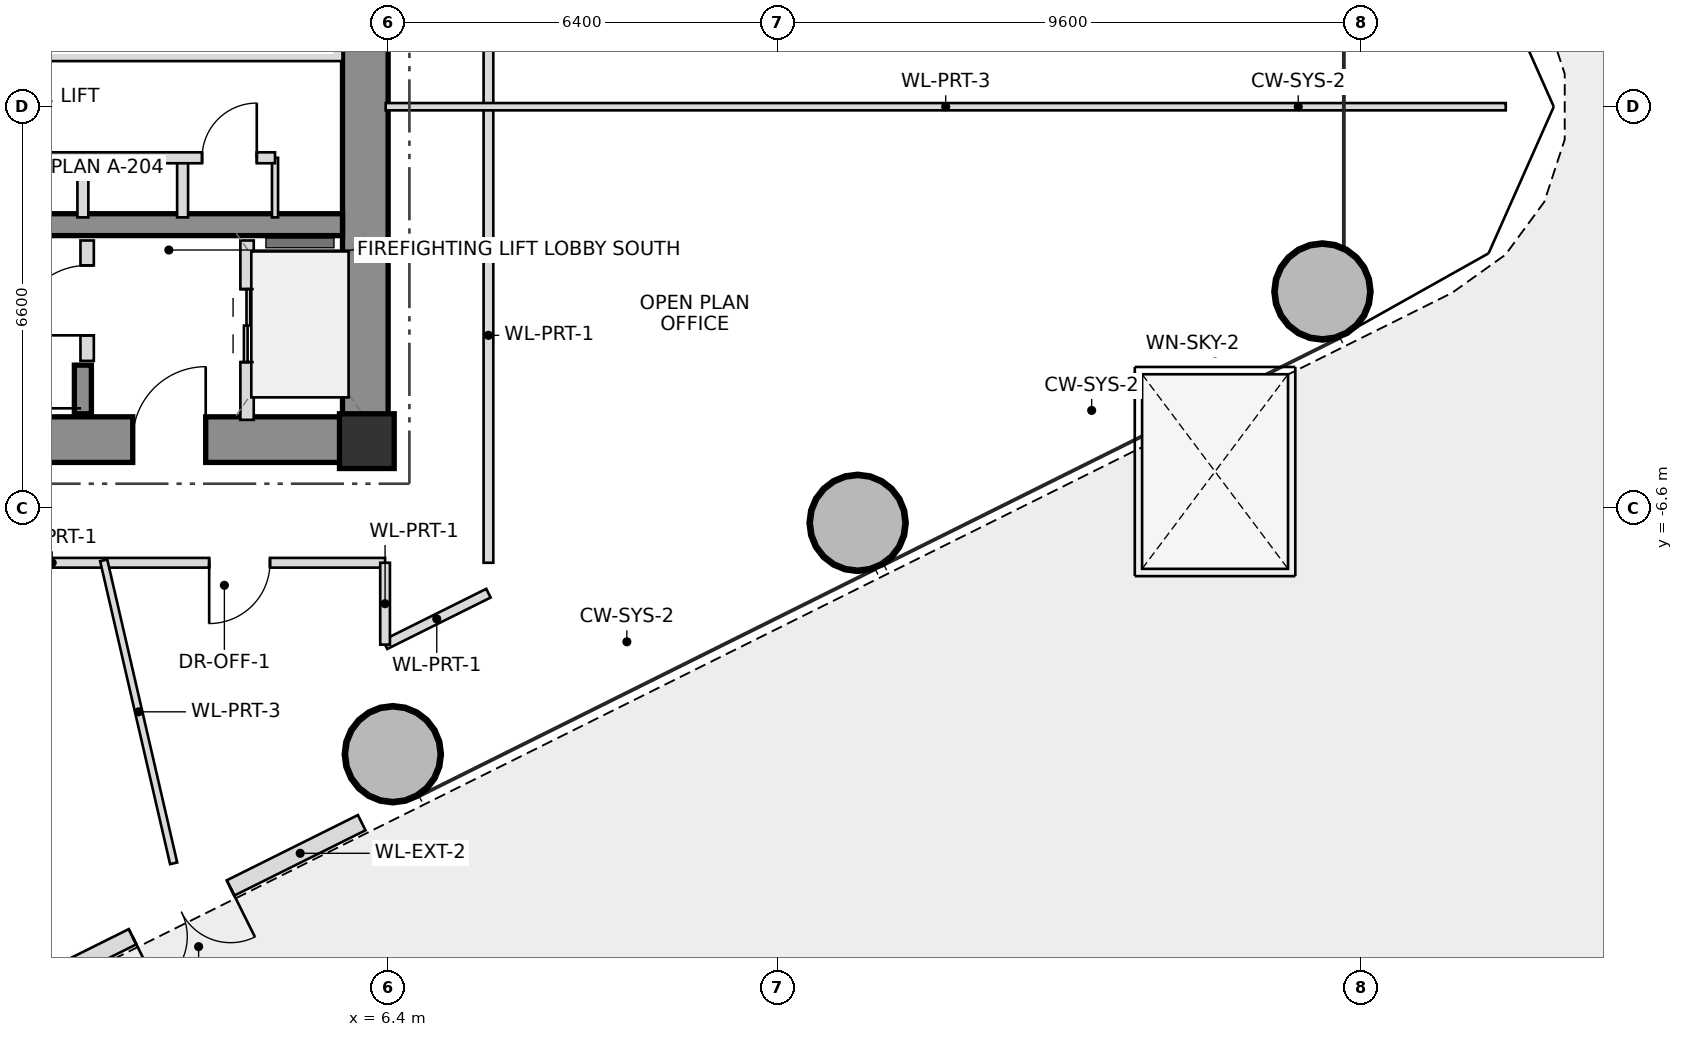
"""IFC4 building model, lengths in metres.
Left out: names, types, materials, properties, quantities, classifications, styles, units other than length and angle.
Written with IfcOpenShell. Run it as: python <this file> out.ifc"""

import sys

from ifc_helpers import new_model, si_unit, direction, frame, frame_2d, origin, origin_2d, place, context, subcontext, project, spatial, rectangle, hollow_circle, extrude, source, transform, mapped, element, fill, save


model = new_model("IFC4")
c1 = context("Model", 3, precision=1e-05, world=origin(), true_north=direction((0.0, 1.0)))
c2 = subcontext(c1, "Body", "Model", "MODEL_VIEW")
j1 = project(units=[si_unit("LENGTHUNIT", "METRE"), si_unit("PLANEANGLEUNIT", "RADIAN")], contexts=[c1])
p1 = place(None, origin())
s1 = spatial("IfcSite", under=j1, at=p1, CompositionType="ELEMENT")
p2 = place(p1, origin())
s2 = spatial("IfcBuilding", under=s1, at=p2, CompositionType="ELEMENT")
p3 = place(p2, frame((0.0, 0.0, 20.1)))
s3 = spatial("IfcBuildingStorey", under=s2, at=p3, CompositionType="ELEMENT", Elevation=20.1)
m1 = source(origin(), c2, "Body", "SweptSolid", [
    extrude(rectangle(XDim=0.9, YDim=0.9, at=origin_2d()), origin(), (0.0, 0.0, 1.0), 3.7),
])
p4 = place(p3, frame((6.05, -5.5, 0.0), z_axis=(0.0, 0.0, 1.0), x_axis=(1.0, 0.0, 0.0)))
e1 = element("IfcColumn", 1, at=p4, inside=s3, PredefinedType="COLUMN", context=c2, shape_type="MappedRepresentation", body=[
    mapped(m1, transform((0.0, 0.0, 0.0), scale=1.0)),
])
p5 = place(p3, frame((-6.4, -5.475, 0.0), z_axis=(0.0, 0.0, 1.0), x_axis=(1.0, 0.0, 0.0)))
e2 = element("IfcWall", 2, at=p5, inside=s3, PredefinedType="SHEAR", context=c2, shape_type="SweptSolid", body=[
    extrude(rectangle(XDim=12.8, YDim=0.75, at=frame_2d((6.4, 0.0))), origin(), (0.0, 0.0, 1.0), 3.7),
])
p6 = place(p5, frame((8.6, 0.0, 0.0)))
e3 = element("IfcOpeningElement", 3, at=p6, cuts=e2, PredefinedType="OPENING", context=c2, shape_type="SweptSolid", body=[
    extrude(rectangle(XDim=1.2, YDim=2.2, at=frame_2d((0.6, 1.1))), frame((0.0, 0.385, 0.0), z_axis=(0.0, -1.0, 0.0), x_axis=(1.0, 0.0, 0.0)), (0.0, 0.0, 1.0), 0.77),
])
p7 = place(p3, frame((6.025, -5.1, 0.0), z_axis=(0.0, 0.0, 1.0), x_axis=(0.0, 1.0, 0.0)))
e4 = element("IfcWall", 4, at=p7, inside=s3, PredefinedType="SHEAR", context=c2, shape_type="SweptSolid", body=[
    extrude(rectangle(XDim=10.2, YDim=0.75, at=frame_2d((5.1, 0.0))), origin(), (0.0, 0.0, 1.0), 3.7),
])
p8 = place(p3, frame((-5.65, -1.94, 0.0), z_axis=(0.0, 0.0, 1.0), x_axis=(1.0, 0.0, 0.0)))
e5 = element("IfcWall", 5, at=p8, inside=s3, PredefinedType="SHEAR", context=c2, shape_type="SweptSolid", body=[
    extrude(rectangle(XDim=11.3, YDim=0.36, at=frame_2d((5.65, 0.0))), origin(), (0.0, 0.0, 1.0), 3.7),
])
p9 = place(p3, frame((1.38, -5.05, 0.0), z_axis=(0.0, 0.0, 1.0), x_axis=(0.0, 1.0, 0.0)))
e6 = element("IfcWall", 6, at=p9, inside=s3, PredefinedType="SHEAR", context=c2, shape_type="SweptSolid", body=[
    extrude(rectangle(XDim=0.8, YDim=0.28, at=frame_2d((0.4, 0.0))), origin(), (0.0, 0.0, 1.0), 3.7),
])
m2 = source(origin(), c2, "Body", "SweptSolid", [
    extrude(hollow_circle(Radius=0.8, WallThickness=0.055, at=origin_2d()), origin(), (0.0, 0.0, 1.0), 4.02),
])
for number, where, z_axis, x_axis in (
    (7, (6.477, -10.648, -0.32), (0.0, 0.0, 1.0), (1.0, 0.0, 0.0)),
    (8, (14.122, -6.844, -0.32), (0.0, 0.0, 1.0), (1.0, 0.0, 0.0)),
    (9, (21.766, -3.039, -0.32), (0.0, 0.0, 1.0), (1.0, 0.0, 0.0)),
):
    element("IfcColumn", number, at=place(p3, frame(where, z_axis=z_axis, x_axis=x_axis)), inside=s3, PredefinedType="COLUMN", context=c2, shape_type="MappedRepresentation", body=[
        mapped(m2, transform((0.0, 0.0, 0.0), scale=1.0)),
    ])
p10 = place(p3, frame((5.966, -11.774, 0.0), z_axis=(0.0, 0.0, 1.0), x_axis=(-0.895251869384, -0.445560422798, 0.0)))
e10 = element("IfcWall", 10, at=p10, inside=s3, PredefinedType="SOLIDWALL", context=c2, shape_type="SweptSolid", body=[
    extrude(rectangle(XDim=6.619, YDim=0.28, at=frame_2d((3.31, 0.0))), origin(), (0.0, 0.0, 1.0), 2.915),
])
p11 = place(p10, frame((2.409, 0.0, 0.0)))
e11 = element("IfcOpeningElement", 11, at=p11, cuts=e10, PredefinedType="OPENING", context=c2, shape_type="SweptSolid", body=[
    extrude(rectangle(XDim=1.8, YDim=2.35, at=frame_2d((0.9, 1.175))), frame((0.0, 0.15, 0.0), z_axis=(0.0, -1.0, 0.0), x_axis=(1.0, 0.0, 0.0)), (0.0, 0.0, 1.0), 0.3),
])
p12 = place(p3, frame((1.45, -4.18, 0.0), z_axis=(0.0, 0.0, 1.0), x_axis=(0.0, 1.0, 0.0)))
e12 = element("IfcWall", 12, at=p12, inside=s3, PredefinedType="PLUMBINGWALL", context=c2, shape_type="SweptSolid", body=[
    extrude(rectangle(XDim=1.98, YDim=0.22, at=frame_2d((0.99, 0.0))), origin(), (0.0, 0.0, 1.0), 3.495),
])
p13 = place(p12, frame((0.42, 0.0, 0.0)))
e13 = element("IfcOpeningElement", 13, at=p13, cuts=e12, PredefinedType="OPENING", context=c2, shape_type="SweptSolid", body=[
    extrude(rectangle(XDim=1.15, YDim=2.15, at=frame_2d((0.575, 1.075))), frame((0.0, 0.12, 0.0), z_axis=(0.0, -1.0, 0.0), x_axis=(1.0, 0.0, 0.0)), (0.0, 0.0, 1.0), 0.24),
])
p14 = place(p3, frame((4.08, -5.15, 0.0), z_axis=(0.0, 0.0, 1.0), x_axis=(0.0, 1.0, 0.0)))
e14 = element("IfcWall", 14, at=p14, inside=s3, PredefinedType="PLUMBINGWALL", context=c2, shape_type="SweptSolid", body=[
    extrude(rectangle(XDim=2.95, YDim=0.22, at=frame_2d((1.475, 0.0))), origin(), (0.0, 0.0, 1.0), 3.495),
])
p15 = place(p14, frame((0.95, 0.0, 0.0)))
e15 = element("IfcOpeningElement", 15, at=p15, cuts=e14, PredefinedType="OPENING", context=c2, shape_type="SweptSolid", body=[
    extrude(rectangle(XDim=1.2, YDim=2.25, at=frame_2d((0.6, 1.125))), frame((0.0, 0.12, 0.0), z_axis=(0.0, -1.0, 0.0), x_axis=(1.0, 0.0, 0.0)), (0.0, 0.0, 1.0), 0.24),
])
for number, where, z_axis, x_axis in (
    (16, (1.38, 0.84, 0.0), (0.0, 0.0, 1.0), (0.0, 1.0, 0.0)),
    (17, (1.38, -1.82, 0.0), (0.0, 0.0, 1.0), (0.0, 1.0, 0.0)),
    (18, (3.02, 0.84, 0.0), (0.0, 0.0, 1.0), (0.0, 1.0, 0.0)),
    (19, (4.38, 0.84, 0.0), (0.0, 0.0, 1.0), (0.0, 1.0, 0.0)),
    (20, (3.02, -1.82, 0.0), (0.0, 0.0, 1.0), (0.0, 1.0, 0.0)),
):
    element("IfcWall", number, at=place(p3, frame(where, z_axis=z_axis, x_axis=x_axis)), inside=s3, PredefinedType="PLUMBINGWALL", context=c2, shape_type="SweptSolid", body=[
        extrude(rectangle(XDim=0.98, YDim=0.18, at=frame_2d((0.49, 0.0))), origin(), (0.0, 0.0, 1.0), 3.495),
    ])
p16 = place(p3, frame((4.54, -1.82, 0.0), z_axis=(0.0, 0.0, 1.0), x_axis=(0.0, 1.0, 0.0)))
e21 = element("IfcWall", 21, at=p16, inside=s3, PredefinedType="PARTITIONING", context=c2, shape_type="SweptSolid", body=[
    extrude(rectangle(XDim=0.98, YDim=0.1, at=frame_2d((0.49, 0.0))), origin(), (0.0, 0.0, 1.0), 3.495),
])
p17 = place(p3, frame((-5.68, 0.84, 0.0), z_axis=(0.0, 0.0, 1.0), x_axis=(1.0, 0.0, 0.0)))
e22 = element("IfcWall", 22, at=p17, inside=s3, PredefinedType="PLUMBINGWALL", context=c2, shape_type="SweptSolid", body=[
    extrude(rectangle(XDim=11.33, YDim=0.18, at=frame_2d((5.665, 0.0))), origin(), (0.0, 0.0, 1.0), 3.495),
])
p18 = place(p17, frame((0.43, 0.0, 0.0)))
e23 = element("IfcOpeningElement", 23, at=p18, cuts=e22, PredefinedType="OPENING", context=c2, shape_type="SweptSolid", body=[
    extrude(rectangle(XDim=1.1, YDim=2.2, at=frame_2d((0.55, 1.1))), frame((0.0, 0.1, 0.0), z_axis=(0.0, -1.0, 0.0), x_axis=(1.0, 0.0, 0.0)), (0.0, 0.0, 1.0), 0.2),
])
p19 = place(p17, frame((2.13, 0.0, 0.0)))
e24 = element("IfcOpeningElement", 24, at=p19, cuts=e22, PredefinedType="OPENING", context=c2, shape_type="SweptSolid", body=[
    extrude(rectangle(XDim=1.1, YDim=2.2, at=frame_2d((0.55, 1.1))), frame((0.0, 0.1, 0.0), z_axis=(0.0, -1.0, 0.0), x_axis=(1.0, 0.0, 0.0)), (0.0, 0.0, 1.0), 0.2),
])
p20 = place(p3, frame((-5.68, -0.84, 0.0), z_axis=(0.0, 0.0, 1.0), x_axis=(1.0, 0.0, 0.0)))
e25 = element("IfcWall", 25, at=p20, inside=s3, PredefinedType="PLUMBINGWALL", context=c2, shape_type="SweptSolid", body=[
    extrude(rectangle(XDim=10.22, YDim=0.18, at=frame_2d((5.11, 0.0))), origin(), (0.0, 0.0, 1.0), 3.495),
])
p21 = place(p20, frame((0.43, 0.0, 0.0)))
e26 = element("IfcOpeningElement", 26, at=p21, cuts=e25, PredefinedType="OPENING", context=c2, shape_type="SweptSolid", body=[
    extrude(rectangle(XDim=1.1, YDim=2.2, at=frame_2d((0.55, 1.1))), frame((0.0, 0.1, 0.0), z_axis=(0.0, -1.0, 0.0), x_axis=(1.0, 0.0, 0.0)), (0.0, 0.0, 1.0), 0.2),
])
p22 = place(p20, frame((2.13, 0.0, 0.0)))
e27 = element("IfcOpeningElement", 27, at=p22, cuts=e25, PredefinedType="OPENING", context=c2, shape_type="SweptSolid", body=[
    extrude(rectangle(XDim=1.1, YDim=2.2, at=frame_2d((0.55, 1.1))), frame((0.0, 0.1, 0.0), z_axis=(0.0, -1.0, 0.0), x_axis=(1.0, 0.0, 0.0)), (0.0, 0.0, 1.0), 0.2),
])
p23 = place(p20, frame((9.02, 0.0, 0.0)))
e28 = element("IfcOpeningElement", 28, at=p23, cuts=e25, PredefinedType="OPENING", context=c2, shape_type="SweptSolid", body=[
    extrude(rectangle(XDim=0.9, YDim=2.05, at=frame_2d((0.45, 1.025))), frame((0.0, 0.1, 0.0), z_axis=(0.0, -1.0, 0.0), x_axis=(1.0, 0.0, 0.0)), (0.0, 0.0, 1.0), 0.2),
])
p24 = place(p3, frame((6.35, -7.5, 0.0), z_axis=(0.0, 0.0, 1.0), x_axis=(-1.0, 0.0, 0.0)))
e29 = element("IfcWall", 29, at=p24, inside=s3, PredefinedType="PARTITIONING", context=c2, shape_type="SweptSolid", body=[
    extrude(rectangle(XDim=12.7, YDim=0.16, at=frame_2d((6.35, 0.0))), origin(), (0.0, 0.0, 1.0), 2.8),
])
p25 = place(p24, frame((1.893, 0.0, 0.0)))
e30 = element("IfcOpeningElement", 30, at=p25, cuts=e29, PredefinedType="OPENING", context=c2, shape_type="SweptSolid", body=[
    extrude(rectangle(XDim=1.0, YDim=2.25, at=frame_2d((0.5, 1.125))), frame((0.0, 0.09, 0.0), z_axis=(0.0, -1.0, 0.0), x_axis=(1.0, 0.0, 0.0)), (0.0, 0.0, 1.0), 0.18),
])
p26 = place(p24, frame((8.057, 0.0, 0.0)))
e31 = element("IfcOpeningElement", 31, at=p26, cuts=e29, PredefinedType="OPENING", context=c2, shape_type="SweptSolid", body=[
    extrude(rectangle(XDim=1.0, YDim=2.25, at=frame_2d((0.5, 1.125))), frame((0.0, 0.09, 0.0), z_axis=(0.0, -1.0, 0.0), x_axis=(1.0, 0.0, 0.0)), (0.0, 0.0, 1.0), 0.18),
])
for number, where, z_axis, x_axis in (
    (32, (8.05, 7.5, 0.0), (0.0, 0.0, 1.0), (0.0, -1.0, 0.0)),
    (33, (8.05, -0.02, 0.0), (0.0, 0.0, 1.0), (0.0, -1.0, 0.0)),
):
    element("IfcWall", number, at=place(p3, frame(where, z_axis=z_axis, x_axis=x_axis)), inside=s3, PredefinedType="PARTITIONING", context=c2, shape_type="SweptSolid", body=[
        extrude(rectangle(XDim=7.48, YDim=0.16, at=frame_2d((3.74, 0.0))), origin(), (0.0, 0.0, 1.0), 2.8),
    ])
p27 = place(p3, frame((8.05, -8.0, 0.0), z_axis=(0.0, 0.0, 1.0), x_axis=(-0.895274181873, -0.445515588136, 0.0)))
e34 = element("IfcWall", 34, at=p27, inside=s3, PredefinedType="PARTITIONING", context=c2, shape_type="SweptSolid", body=[
    extrude(rectangle(XDim=1.899, YDim=0.16, at=frame_2d((0.949, 0.0))), origin(), (0.0, 0.0, 1.0), 2.8),
])
p28 = place(p3, frame((6.35, -8.846, 0.0), z_axis=(0.0, 0.0, 1.0), x_axis=(0.0, 1.0, 0.0)))
e35 = element("IfcWall", 35, at=p28, inside=s3, PredefinedType="PARTITIONING", context=c2, shape_type="SweptSolid", body=[
    extrude(rectangle(XDim=1.346, YDim=0.16, at=frame_2d((0.673, 0.0))), origin(), (0.0, 0.0, 1.0), 2.8),
])
p29 = place(p3, frame((6.36, 0.0, 0.0), z_axis=(0.0, 0.0, 1.0), x_axis=(1.0, 0.0, 0.0)))
e36 = element("IfcWall", 36, at=p29, inside=s3, PredefinedType="PARTITIONING", context=c2, shape_type="SweptSolid", body=[
    extrude(rectangle(XDim=18.421, YDim=0.12, at=frame_2d((9.21, 0.0))), origin(), (0.0, 0.0, 1.0), 2.96),
])
p30 = place(p3, frame((1.722, -7.46, 0.0), z_axis=(0.0, 0.0, 1.0), x_axis=(0.224925758796, -0.974375904377, 0.0)))
e37 = element("IfcWall", 37, at=p30, inside=s3, PredefinedType="PARTITIONING", context=c2, shape_type="SweptSolid", body=[
    extrude(rectangle(XDim=5.114, YDim=0.12, at=frame_2d((2.557, 0.0))), origin(), (0.0, 0.0, 1.0), 2.96),
])
p31 = place(p3, frame((0.0, 0.0, -0.32)))
p32 = place(p31, frame((20.0, -6.0, 0.0)))
p33 = place(p32, frame((0.0, 0.0, 0.27)))
e38 = element("IfcWindow", 38, at=p33, inside=s3, PartitioningType="SINGLE_PANEL", PredefinedType="SKYLIGHT", context=c2, shape_type="SweptSolid", body=[
    extrude(rectangle(XDim=2.4, YDim=3.2, at=origin_2d()), origin(), (0.0, 0.0, 1.0), 0.05),
])
p34 = place(p11, origin())
e39 = element("IfcDoor", 39, at=p34, inside=s3, OperationType="DOUBLE_DOOR_SINGLE_SWING", PredefinedType="DOOR", context=c2, shape_type="SweptSolid", body=[
    extrude(rectangle(XDim=1.8, YDim=2.35, at=frame_2d((0.9, 1.175))), frame((0.0, 0.025, 0.0), z_axis=(0.0, -1.0, 0.0), x_axis=(1.0, 0.0, 0.0)), (0.0, 0.0, 1.0), 0.05),
])
fill(e11, e39)
p35 = place(p6, origin())
e40 = element("IfcDoor", 40, at=p35, inside=s3, OperationType="SINGLE_SWING_RIGHT", PredefinedType="DOOR", context=c2, shape_type="SweptSolid", body=[
    extrude(rectangle(XDim=1.2, YDim=2.2, at=frame_2d((0.6, 1.1))), frame((0.0, 0.025, 0.0), z_axis=(0.0, -1.0, 0.0), x_axis=(1.0, 0.0, 0.0)), (0.0, 0.0, 1.0), 0.05),
])
fill(e3, e40)
p36 = place(p13, origin())
e41 = element("IfcDoor", 41, at=p36, inside=s3, OperationType="SINGLE_SWING_LEFT", PredefinedType="DOOR", context=c2, shape_type="SweptSolid", body=[
    extrude(rectangle(XDim=1.15, YDim=2.15, at=frame_2d((0.575, 1.075))), frame((0.0, 0.025, 0.0), z_axis=(0.0, -1.0, 0.0), x_axis=(1.0, 0.0, 0.0)), (0.0, 0.0, 1.0), 0.05),
])
fill(e13, e41)
p37 = place(p15, origin())
e42 = element("IfcDoor", 42, at=p37, inside=s3, OperationType="DOUBLE_DOOR_SLIDING", PredefinedType="DOOR", context=c2, shape_type="SweptSolid", body=[
    extrude(rectangle(XDim=1.2, YDim=2.25, at=frame_2d((0.6, 1.125))), frame((0.0, 0.025, 0.0), z_axis=(0.0, -1.0, 0.0), x_axis=(1.0, 0.0, 0.0)), (0.0, 0.0, 1.0), 0.05),
])
fill(e15, e42)
p38 = place(p23, origin())
e43 = element("IfcDoor", 43, at=p38, inside=s3, OperationType="SINGLE_SWING_RIGHT", PredefinedType="DOOR", context=c2, shape_type="SweptSolid", body=[
    extrude(rectangle(XDim=0.9, YDim=2.05, at=frame_2d((0.45, 1.025))), frame((0.0, 0.025, 0.0), z_axis=(0.0, -1.0, 0.0), x_axis=(1.0, 0.0, 0.0)), (0.0, 0.0, 1.0), 0.05),
])
fill(e28, e43)
p39 = place(p25, origin())
e44 = element("IfcDoor", 44, at=p39, inside=s3, OperationType="SINGLE_SWING_RIGHT", PredefinedType="DOOR", context=c2, shape_type="SweptSolid", body=[
    extrude(rectangle(XDim=1.0, YDim=2.25, at=frame_2d((0.5, 1.125))), frame((0.0, 0.025, 0.0), z_axis=(0.0, -1.0, 0.0), x_axis=(1.0, 0.0, 0.0)), (0.0, 0.0, 1.0), 0.05),
])
fill(e30, e44)
save(model, sys.argv[1])
